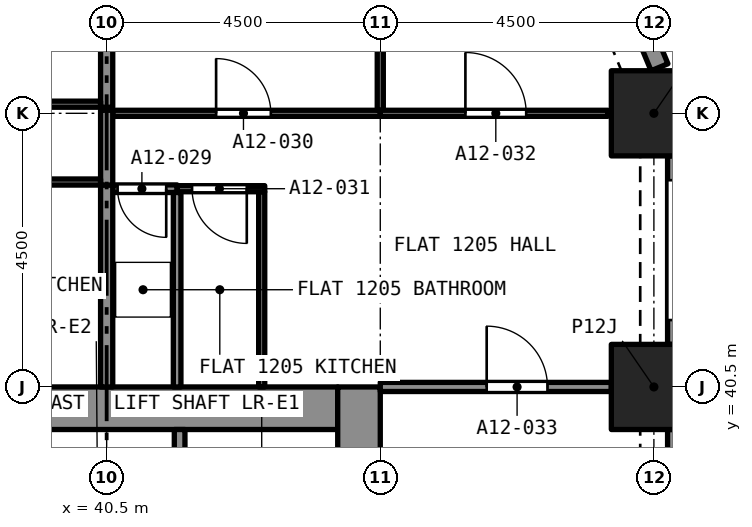
"""IFC4 building model, lengths in metres.
Left out: names, types, materials, properties, quantities, classifications, styles, units other than length and angle.
Written with IfcOpenShell. Run it as: python <this file> out.ifc"""

import sys

from ifc_helpers import new_model, si_unit, direction, frame, frame_2d, origin, origin_2d, place, context, subcontext, project, spatial, rectangle, extrude, element, fill, save


model = new_model("IFC4")
c1 = context("Model", 3, precision=1e-05, world=origin(), true_north=direction((0.0, 1.0)))
c2 = subcontext(c1, "Body", "Model", "MODEL_VIEW")
j1 = project(units=[si_unit("LENGTHUNIT", "METRE"), si_unit("PLANEANGLEUNIT", "RADIAN")], contexts=[c1])
p1 = place(None, origin())
s1 = spatial("IfcSite", under=j1, at=p1, CompositionType="ELEMENT")
p2 = place(p1, origin())
s2 = spatial("IfcBuilding", under=s1, at=p2, CompositionType="ELEMENT")
p3 = place(p2, frame((0.0, 0.0, 49.6)))
s3 = spatial("IfcBuildingStorey", under=s2, at=p3, CompositionType="ELEMENT", Elevation=49.6)
for number, where, z_axis, x_axis in (
    (1, (49.5, 40.5, 0.0), (0.0, 0.0, 1.0), (1.0, 0.0, 0.0)),
    (2, (49.5, 45.0, 0.0), (0.0, 0.0, 1.0), (1.0, 0.0, 0.0)),
):
    element("IfcColumn", number, at=place(p3, frame(where, z_axis=z_axis, x_axis=x_axis)), inside=s3, PredefinedType="COLUMN", context=c2, shape_type="SweptSolid", body=[
        extrude(rectangle(XDim=1.4, YDim=1.4, at=origin_2d()), origin(), (0.0, 0.0, 1.0), 3.2),
    ])
p4 = place(p3, frame((36.7, 40.15, 0.0), z_axis=(0.0, 0.0, 1.0), x_axis=(1.0, 0.0, 0.0)))
e3 = element("IfcWall", 3, at=p4, inside=s3, PredefinedType="SOLIDWALL", context=c2, shape_type="SweptSolid", body=[
    extrude(rectangle(XDim=7.6, YDim=0.7, at=frame_2d((3.8, 0.0))), origin(), (0.0, 0.0, 1.0), 3.2),
])
p5 = place(p3, frame((44.65, 27.0, 0.0), z_axis=(0.0, 0.0, 1.0), x_axis=(0.0, 1.0, 0.0)))
e4 = element("IfcWall", 4, at=p5, inside=s3, PredefinedType="SOLIDWALL", context=c2, shape_type="SweptSolid", body=[
    extrude(rectangle(XDim=13.5, YDim=0.7, at=frame_2d((6.75, 0.0))), origin(), (0.0, 0.0, 1.0), 3.2),
])
p6 = place(p5, frame((8.95, 0.0, 0.0)))
e5 = element("IfcOpeningElement", 5, at=p6, cuts=e4, PredefinedType="OPENING", context=c2, shape_type="SweptSolid", body=[
    extrude(rectangle(XDim=1.2, YDim=2.1, at=frame_2d((0.6, 1.05))), frame((0.0, 0.36, 0.0), z_axis=(0.0, -1.0, 0.0), x_axis=(1.0, 0.0, 0.0)), (0.0, 0.0, 1.0), 0.72),
])
p7 = place(p3, frame((49.875, 39.8, 0.0), z_axis=(0.0, 0.0, 1.0), x_axis=(0.0, -1.0, 0.0)))
e6 = element("IfcWall", 6, at=p7, inside=s3, PredefinedType="SOLIDWALL", context=c2, shape_type="SweptSolid", body=[
    extrude(rectangle(XDim=3.1, YDim=0.3, at=frame_2d((1.55, 0.0))), origin(), (0.0, 0.0, 1.0), 3.2),
])
p8 = place(p7, frame((0.4, 0.0, 0.45)))
e7 = element("IfcOpeningElement", 7, at=p8, cuts=e6, PredefinedType="OPENING", context=c2, shape_type="SweptSolid", body=[
    extrude(rectangle(XDim=2.3, YDim=1.95, at=frame_2d((1.15, 0.975))), frame((0.0, 0.16, 0.0), z_axis=(0.0, -1.0, 0.0), x_axis=(1.0, 0.0, 0.0)), (0.0, 0.0, 1.0), 0.32),
])
p9 = place(p3, frame((49.875, 44.3, 0.0), z_axis=(0.0, 0.0, 1.0), x_axis=(0.0, -1.0, 0.0)))
e8 = element("IfcWall", 8, at=p9, inside=s3, PredefinedType="SOLIDWALL", context=c2, shape_type="SweptSolid", body=[
    extrude(rectangle(XDim=3.1, YDim=0.3, at=frame_2d((1.55, 0.0))), origin(), (0.0, 0.0, 1.0), 3.2),
])
p10 = place(p9, frame((0.4, 0.0, 0.45)))
e9 = element("IfcOpeningElement", 9, at=p10, cuts=e8, PredefinedType="OPENING", context=c2, shape_type="SweptSolid", body=[
    extrude(rectangle(XDim=2.3, YDim=1.95, at=frame_2d((1.15, 0.975))), frame((0.0, 0.16, 0.0), z_axis=(0.0, -1.0, 0.0), x_axis=(1.0, 0.0, 0.0)), (0.0, 0.0, 1.0), 0.32),
])
p11 = place(p3, frame((48.878, 47.48, 0.0), z_axis=(0.0, 0.0, 1.0), x_axis=(0.38262540684, -0.923903565336, 0.0)))
e10 = element("IfcWall", 10, at=p11, inside=s3, PredefinedType="SOLIDWALL", context=c2, shape_type="SweptSolid", body=[
    extrude(rectangle(XDim=1.865, YDim=0.3, at=frame_2d((0.933, 0.0))), origin(), (0.0, 0.0, 1.0), 3.2),
])
p12 = place(p11, frame((0.258, 0.0, 0.45)))
e11 = element("IfcOpeningElement", 11, at=p12, cuts=e10, PredefinedType="OPENING", context=c2, shape_type="SweptSolid", body=[
    extrude(rectangle(XDim=1.1, YDim=1.95, at=frame_2d((0.55, 0.975))), frame((0.0, 0.16, 0.0), z_axis=(0.0, -1.0, 0.0), x_axis=(1.0, 0.0, 0.0)), (0.0, 0.0, 1.0), 0.32),
])
p13 = place(p3, frame((41.659, 43.76, 0.0), z_axis=(0.0, 0.0, 1.0), x_axis=(-1.0, 0.0, 0.0)))
e12 = element("IfcWall", 12, at=p13, inside=s3, PredefinedType="PARTITIONING", context=c2, shape_type="SweptSolid", body=[
    extrude(rectangle(XDim=1.059, YDim=0.125, at=frame_2d((0.53, 0.0))), origin(), (0.0, 0.0, 1.0), 2.9),
])
p14 = place(p13, frame((0.179, 0.0, 0.0)))
e13 = element("IfcOpeningElement", 13, at=p14, cuts=e12, PredefinedType="OPENING", context=c2, shape_type="SweptSolid", body=[
    extrude(rectangle(XDim=0.8, YDim=2.1, at=frame_2d((0.4, 1.05))), frame((0.0, 0.073, 0.0), z_axis=(0.0, -1.0, 0.0), x_axis=(1.0, 0.0, 0.0)), (0.0, 0.0, 1.0), 0.145),
])
p15 = place(p3, frame((41.659, 40.5, 0.0), z_axis=(0.0, 0.0, 1.0), x_axis=(0.0, 1.0, 0.0)))
e14 = element("IfcWall", 14, at=p15, inside=s3, PredefinedType="PARTITIONING", context=c2, shape_type="SweptSolid", body=[
    extrude(rectangle(XDim=3.198, YDim=0.125, at=frame_2d((1.599, 0.0))), origin(), (0.0, 0.0, 1.0), 2.9),
])
p16 = place(p3, frame((40.5, 40.5, 0.0), z_axis=(0.0, 0.0, 1.0), x_axis=(0.0, 1.0, 0.0)))
e15 = element("IfcWall", 15, at=p16, inside=s3, PredefinedType="PARTITIONING", context=c2, shape_type="SweptSolid", body=[
    extrude(rectangle(XDim=3.323, YDim=0.2, at=frame_2d((1.661, 0.0))), origin(), (0.0, 0.0, 1.0), 2.9),
])
p17 = place(p3, frame((40.6, 45.0, 0.0), z_axis=(0.0, 0.0, 1.0), x_axis=(1.0, 0.0, 0.0)))
e16 = element("IfcWall", 16, at=p17, inside=s3, PredefinedType="PARTITIONING", context=c2, shape_type="SweptSolid", body=[
    extrude(rectangle(XDim=4.4, YDim=0.1, at=frame_2d((2.2, 0.0))), origin(), (0.0, 0.0, 1.0), 2.9),
])
p18 = place(p17, frame((1.7, 0.0, 0.0)))
e17 = element("IfcOpeningElement", 17, at=p18, cuts=e16, PredefinedType="OPENING", context=c2, shape_type="SweptSolid", body=[
    extrude(rectangle(XDim=0.9, YDim=2.1, at=frame_2d((0.45, 1.05))), frame((0.0, 0.06, 0.0), z_axis=(0.0, -1.0, 0.0), x_axis=(1.0, 0.0, 0.0)), (0.0, 0.0, 1.0), 0.12),
])
p19 = place(p3, frame((45.0, 45.05, 0.0), z_axis=(0.0, 0.0, 1.0), x_axis=(0.0, 1.0, 0.0)))
e18 = element("IfcWall", 18, at=p19, inside=s3, PredefinedType="PARTITIONING", context=c2, shape_type="SweptSolid", body=[
    extrude(rectangle(XDim=3.692, YDim=0.1, at=frame_2d((1.846, 0.0))), origin(), (0.0, 0.0, 1.0), 2.9),
])
p20 = place(p3, frame((40.5, 45.1, 0.0), z_axis=(0.0, 0.0, 1.0), x_axis=(0.0, 1.0, 0.0)))
e19 = element("IfcWall", 19, at=p20, inside=s3, PredefinedType="PARTITIONING", context=c2, shape_type="SweptSolid", body=[
    extrude(rectangle(XDim=3.7, YDim=0.2, at=frame_2d((1.85, 0.0))), origin(), (0.0, 0.0, 1.0), 2.9),
])
p21 = place(p3, frame((43.05, 40.5, 0.0), z_axis=(0.0, 0.0, 1.0), x_axis=(0.0, 1.0, 0.0)))
e20 = element("IfcWall", 20, at=p21, inside=s3, PredefinedType="PARTITIONING", context=c2, shape_type="SweptSolid", body=[
    extrude(rectangle(XDim=3.21, YDim=0.1, at=frame_2d((1.605, 0.0))), origin(), (0.0, 0.0, 1.0), 2.9),
])
p22 = place(p3, frame((43.1, 43.76, 0.0), z_axis=(0.0, 0.0, 1.0), x_axis=(-1.0, 0.0, 0.0)))
e21 = element("IfcWall", 21, at=p22, inside=s3, PredefinedType="PARTITIONING", context=c2, shape_type="SweptSolid", body=[
    extrude(rectangle(XDim=1.441, YDim=0.1, at=frame_2d((0.72, 0.0))), origin(), (0.0, 0.0, 1.0), 2.9),
])
p23 = place(p22, frame((0.295, 0.0, 0.0)))
e22 = element("IfcOpeningElement", 22, at=p23, cuts=e21, PredefinedType="OPENING", context=c2, shape_type="SweptSolid", body=[
    extrude(rectangle(XDim=0.9, YDim=2.1, at=frame_2d((0.45, 1.05))), frame((0.0, 0.06, 0.0), z_axis=(0.0, -1.0, 0.0), x_axis=(1.0, 0.0, 0.0)), (0.0, 0.0, 1.0), 0.12),
])
p24 = place(p3, frame((45.0, 45.0, 0.0), z_axis=(0.0, 0.0, 1.0), x_axis=(1.0, 0.0, 0.0)))
e23 = element("IfcWall", 23, at=p24, inside=s3, PredefinedType="PARTITIONING", context=c2, shape_type="SweptSolid", body=[
    extrude(rectangle(XDim=3.742, YDim=0.1, at=frame_2d((1.871, 0.0))), origin(), (0.0, 0.0, 1.0), 2.9),
])
p25 = place(p24, frame((1.4, 0.0, 0.0)))
e24 = element("IfcOpeningElement", 24, at=p25, cuts=e23, PredefinedType="OPENING", context=c2, shape_type="SweptSolid", body=[
    extrude(rectangle(XDim=1.0, YDim=2.1, at=frame_2d((0.5, 1.05))), frame((0.0, 0.06, 0.0), z_axis=(0.0, -1.0, 0.0), x_axis=(1.0, 0.0, 0.0)), (0.0, 0.0, 1.0), 0.12),
])
p26 = place(p3, frame((40.5, 43.82, 0.0), z_axis=(0.0, 0.0, 1.0), x_axis=(0.0, 1.0, 0.0)))
e25 = element("IfcWall", 25, at=p26, inside=s3, PredefinedType="PARTITIONING", context=c2, shape_type="SweptSolid", body=[
    extrude(rectangle(XDim=1.23, YDim=0.2, at=frame_2d((0.615, 0.0))), origin(), (0.0, 0.0, 1.0), 2.9),
])
p27 = place(p3, frame((45.0, 40.5, 0.0), z_axis=(0.0, 0.0, 1.0), x_axis=(1.0, 0.0, 0.0)))
e26 = element("IfcWall", 26, at=p27, inside=s3, PredefinedType="PARTITIONING", context=c2, shape_type="SweptSolid", body=[
    extrude(rectangle(XDim=3.8, YDim=0.15, at=frame_2d((1.9, 0.0))), origin(), (0.0, 0.0, 1.0), 2.9),
])
p28 = place(p27, frame((1.75, 0.0, 0.0)))
e27 = element("IfcOpeningElement", 27, at=p28, cuts=e26, PredefinedType="OPENING", context=c2, shape_type="SweptSolid", body=[
    extrude(rectangle(XDim=1.0, YDim=2.1, at=frame_2d((0.5, 1.05))), frame((0.0, 0.085, 0.0), z_axis=(0.0, -1.0, 0.0), x_axis=(1.0, 0.0, 0.0)), (0.0, 0.0, 1.0), 0.17),
])
p29 = place(p3, frame((36.0, 45.15, 0.0), z_axis=(0.0, 0.0, 1.0), x_axis=(1.0, 0.0, 0.0)))
e28 = element("IfcWall", 28, at=p29, inside=s3, PredefinedType="PARTITIONING", context=c2, shape_type="SweptSolid", body=[
    extrude(rectangle(XDim=4.4, YDim=0.1, at=frame_2d((2.2, 0.0))), origin(), (0.0, 0.0, 1.0), 2.9),
])
p30 = place(p29, frame((1.8, 0.0, 0.0)))
e29 = element("IfcOpeningElement", 29, at=p30, cuts=e28, PredefinedType="OPENING", context=c2, shape_type="SweptSolid", body=[
    extrude(rectangle(XDim=0.9, YDim=2.1, at=frame_2d((0.45, 1.05))), frame((0.0, 0.06, 0.0), z_axis=(0.0, -1.0, 0.0), x_axis=(1.0, 0.0, 0.0)), (0.0, 0.0, 1.0), 0.12),
])
p31 = place(p3, frame((40.4, 43.87, 0.0), z_axis=(0.0, 0.0, 1.0), x_axis=(-1.0, 0.0, 0.0)))
e30 = element("IfcWall", 30, at=p31, inside=s3, PredefinedType="PARTITIONING", context=c2, shape_type="SweptSolid", body=[
    extrude(rectangle(XDim=3.25, YDim=0.1, at=frame_2d((1.625, 0.0))), origin(), (0.0, 0.0, 1.0), 2.9),
])
p32 = place(p31, frame((1.125, 0.0, 0.0)))
e31 = element("IfcOpeningElement", 31, at=p32, cuts=e30, PredefinedType="OPENING", context=c2, shape_type="SweptSolid", body=[
    extrude(rectangle(XDim=0.9, YDim=2.1, at=frame_2d((0.45, 1.05))), frame((0.0, 0.06, 0.0), z_axis=(0.0, -1.0, 0.0), x_axis=(1.0, 0.0, 0.0)), (0.0, 0.0, 1.0), 0.12),
])
p33 = place(p3, frame((41.7, 37.5, 0.0), z_axis=(0.0, 0.0, 1.0), x_axis=(0.0, 1.0, 0.0)))
e32 = element("IfcWall", 32, at=p33, inside=s3, PredefinedType="SOLIDWALL", context=c2, shape_type="SweptSolid", body=[
    extrude(rectangle(XDim=2.3, YDim=0.175, at=frame_2d((1.15, 0.0))), origin(), (0.0, 0.0, 1.0), 2.9),
])
p34 = place(p14, origin())
e33 = element("IfcDoor", 33, at=p34, inside=s3, OperationType="SINGLE_SWING_RIGHT", PredefinedType="DOOR", context=c2, shape_type="SweptSolid", body=[
    extrude(rectangle(XDim=0.8, YDim=2.1, at=frame_2d((0.4, 1.05))), frame((0.0, 0.025, 0.0), z_axis=(0.0, -1.0, 0.0), x_axis=(1.0, 0.0, 0.0)), (0.0, 0.0, 1.0), 0.05),
])
fill(e13, e33)
p35 = place(p18, origin())
e34 = element("IfcDoor", 34, at=p35, inside=s3, OperationType="SINGLE_SWING_LEFT", PredefinedType="DOOR", context=c2, shape_type="SweptSolid", body=[
    extrude(rectangle(XDim=0.9, YDim=2.1, at=frame_2d((0.45, 1.05))), frame((0.0, 0.025, 0.0), z_axis=(0.0, -1.0, 0.0), x_axis=(1.0, 0.0, 0.0)), (0.0, 0.0, 1.0), 0.05),
])
fill(e17, e34)
p36 = place(p23, origin())
e35 = element("IfcDoor", 35, at=p36, inside=s3, OperationType="SINGLE_SWING_RIGHT", PredefinedType="DOOR", context=c2, shape_type="SweptSolid", body=[
    extrude(rectangle(XDim=0.9, YDim=2.1, at=frame_2d((0.45, 1.05))), frame((0.0, 0.025, 0.0), z_axis=(0.0, -1.0, 0.0), x_axis=(1.0, 0.0, 0.0)), (0.0, 0.0, 1.0), 0.05),
])
fill(e22, e35)
p37 = place(p25, origin())
e36 = element("IfcDoor", 36, at=p37, inside=s3, OperationType="SINGLE_SWING_RIGHT", PredefinedType="DOOR", context=c2, shape_type="SweptSolid", body=[
    extrude(rectangle(XDim=1.0, YDim=2.1, at=frame_2d((0.5, 1.05))), frame((0.0, 0.025, 0.0), z_axis=(0.0, -1.0, 0.0), x_axis=(1.0, 0.0, 0.0)), (0.0, 0.0, 1.0), 0.05),
])
fill(e24, e36)
p38 = place(p28, origin())
e37 = element("IfcDoor", 37, at=p38, inside=s3, OperationType="SINGLE_SWING_RIGHT", PredefinedType="DOOR", context=c2, shape_type="SweptSolid", body=[
    extrude(rectangle(XDim=1.0, YDim=2.1, at=frame_2d((0.5, 1.05))), frame((0.0, 0.025, 0.0), z_axis=(0.0, -1.0, 0.0), x_axis=(1.0, 0.0, 0.0)), (0.0, 0.0, 1.0), 0.05),
])
fill(e27, e37)
save(model, sys.argv[1])
